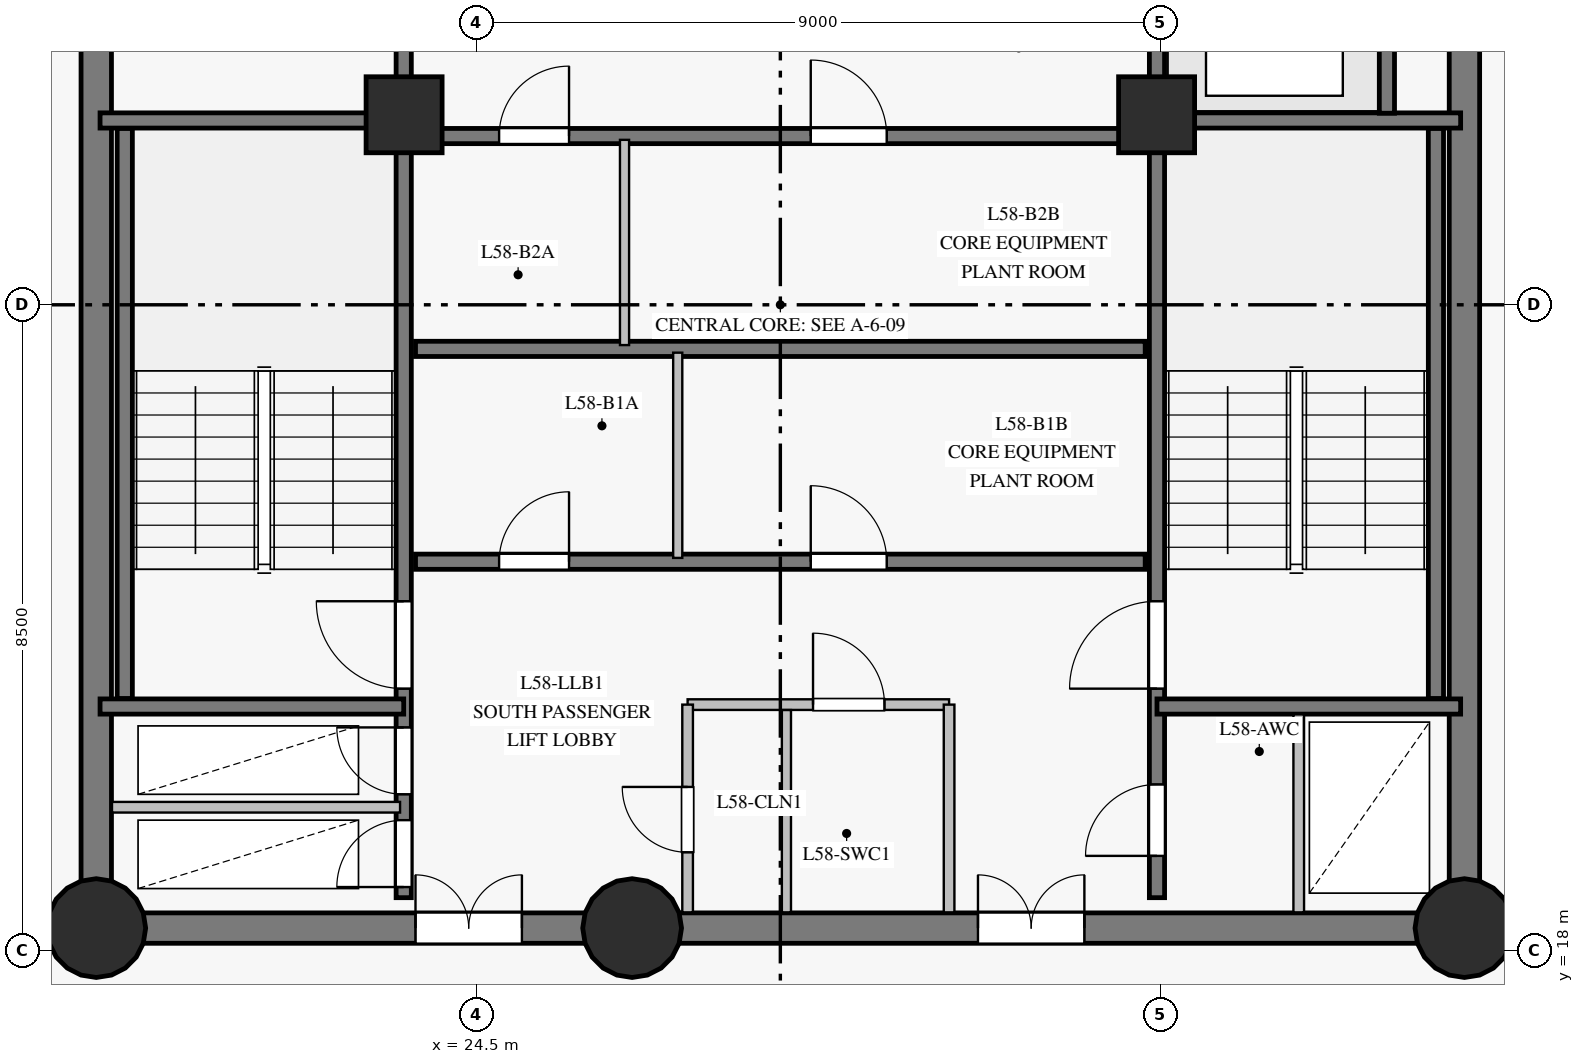
"""IFC4 building model, lengths in metres.
Left out: names, types, materials, properties, quantities, classifications, styles, units other than length and angle.
Written with IfcOpenShell. Run it as: python <this file> out.ifc"""

import sys

from ifc_helpers import new_model, si_unit, direction, frame, frame_2d, origin, origin_with_axes, origin_2d, place, context, subcontext, project, spatial, rectangle, circle, extrude, source, transform, mapped, element, fill, save


model = new_model("IFC4")
c1 = context("Model", 3, precision=1e-05, world=origin(), true_north=direction((0.0, 1.0)))
c2 = subcontext(c1, "Body", "Model", "MODEL_VIEW")
j1 = project(units=[si_unit("LENGTHUNIT", "METRE"), si_unit("PLANEANGLEUNIT", "RADIAN")], contexts=[c1])
p1 = place(None, origin())
s1 = spatial("IfcSite", under=j1, at=p1, CompositionType="ELEMENT")
p2 = place(p1, origin())
s2 = spatial("IfcBuilding", under=s1, at=p2, CompositionType="ELEMENT")
p3 = place(p2, frame((0.0, 0.0, 199.25)))
s3 = spatial("IfcBuildingStorey", under=s2, at=p3, CompositionType="ELEMENT", Elevation=199.25)
p4 = place(p3, frame((19.5, 18.3, 0.0), z_axis=(0.0, 0.0, 1.0), x_axis=(1.0, 0.0, 0.0)))
e1 = element("IfcWall", 1, at=p4, inside=s3, PredefinedType="SHEAR", context=c2, shape_type="SweptSolid", body=[
    extrude(rectangle(XDim=7.05, YDim=0.4, at=frame_2d((3.525, 0.0))), origin(), (0.0, 0.0, 1.0), 2.825),
])
p5 = place(p4, frame((4.2, 0.0, 0.0)))
e2 = element("IfcOpeningElement", 2, at=p5, cuts=e1, PredefinedType="OPENING", context=c2, shape_type="SweptSolid", body=[
    extrude(rectangle(XDim=1.4, YDim=2.2, at=frame_2d((0.7, 1.1))), frame((0.0, 0.21, 0.0), z_axis=(0.0, -1.0, 0.0), x_axis=(1.0, 0.0, 0.0)), (0.0, 0.0, 1.0), 0.42),
])
p6 = place(p3, frame((26.55, 18.3, 0.0), z_axis=(0.0, 0.0, 1.0), x_axis=(1.0, 0.0, 0.0)))
e3 = element("IfcWall", 3, at=p6, inside=s3, PredefinedType="SHEAR", context=c2, shape_type="SweptSolid", body=[
    extrude(rectangle(XDim=10.95, YDim=0.4, at=frame_2d((5.475, 0.0))), origin(), (0.0, 0.0, 1.0), 2.825),
])
p7 = place(p6, frame((4.55, 0.0, 0.0)))
e4 = element("IfcOpeningElement", 4, at=p7, cuts=e3, PredefinedType="OPENING", context=c2, shape_type="SweptSolid", body=[
    extrude(rectangle(XDim=1.4, YDim=2.2, at=frame_2d((0.7, 1.1))), frame((0.0, 0.21, 0.0), z_axis=(0.0, -1.0, 0.0), x_axis=(1.0, 0.0, 0.0)), (0.0, 0.0, 1.0), 0.42),
])
p8 = place(p3, frame((37.5, 18.3, 0.0), z_axis=(0.0, 0.0, 1.0), x_axis=(0.0, 1.0, 0.0)))
e5 = element("IfcWall", 5, at=p8, inside=s3, PredefinedType="SHEAR", context=c2, shape_type="SweptSolid", body=[
    extrude(rectangle(XDim=16.4, YDim=0.4, at=frame_2d((8.2, 0.0))), origin(), (0.0, 0.0, 1.0), 2.825),
])
p9 = place(p8, frame((13.85, 0.0, 0.0)))
e6 = element("IfcOpeningElement", 6, at=p9, cuts=e5, PredefinedType="OPENING", context=c2, shape_type="SweptSolid", body=[
    extrude(rectangle(XDim=1.2, YDim=2.15, at=frame_2d((0.6, 1.075))), frame((0.0, 0.21, 0.0), z_axis=(0.0, -1.0, 0.0), x_axis=(1.0, 0.0, 0.0)), (0.0, 0.0, 1.0), 0.42),
])
p10 = place(p3, frame((19.5, 34.7, 0.0), z_axis=(0.0, 0.0, 1.0), x_axis=(0.0, -1.0, 0.0)))
e7 = element("IfcWall", 7, at=p10, inside=s3, PredefinedType="SHEAR", context=c2, shape_type="SweptSolid", body=[
    extrude(rectangle(XDim=16.4, YDim=0.4, at=frame_2d((8.2, 0.0))), origin(), (0.0, 0.0, 1.0), 2.825),
])
p11 = place(p10, frame((3.24, 0.0, 0.0)))
e8 = element("IfcOpeningElement", 8, at=p11, cuts=e7, PredefinedType="OPENING", context=c2, shape_type="SweptSolid", body=[
    extrude(rectangle(XDim=1.1, YDim=2.15, at=frame_2d((0.55, 1.075))), frame((0.0, 0.21, 0.0), z_axis=(0.0, -1.0, 0.0), x_axis=(1.0, 0.0, 0.0)), (0.0, 0.0, 1.0), 0.42),
])
m1 = source(origin_with_axes(), c2, "Body", "SweptSolid", [
    extrude(circle(Radius=0.65, at=origin_2d()), origin(), (0.0, 0.0, 1.0), 3.05),
])
for number, where, z_axis, x_axis in (
    (9, (19.5, 18.3, 0.0), (0.0, 0.0, 1.0), (1.0, 0.0, 0.0)),
    (10, (26.55, 18.3, 0.0), (0.0, 0.0, 1.0), (1.0, 0.0, 0.0)),
    (11, (37.5, 18.3, 0.0), (0.0, 0.0, 1.0), (1.0, 0.0, 0.0)),
):
    element("IfcColumn", number, at=place(p3, frame(where, z_axis=z_axis, x_axis=x_axis)), inside=s3, PredefinedType="COLUMN", context=c2, shape_type="MappedRepresentation", body=[
        mapped(m1, transform((0.0, 0.0, 0.0), scale=1.0)),
    ])
m2 = source(origin_with_axes(), c2, "Body", "SweptSolid", [
    extrude(rectangle(XDim=1.0, YDim=1.0, at=origin_2d()), origin(), (0.0, 0.0, 1.0), 3.05),
])
for number, where, z_axis, x_axis in (
    (12, (23.55, 29.0, 0.0), (0.0, 0.0, 1.0), (1.0, 0.0, 0.0)),
    (13, (33.45, 29.0, 0.0), (0.0, 0.0, 1.0), (1.0, 0.0, 0.0)),
):
    element("IfcColumn", number, at=place(p3, frame(where, z_axis=z_axis, x_axis=x_axis)), inside=s3, PredefinedType="COLUMN", context=c2, shape_type="MappedRepresentation", body=[
        mapped(m2, transform((0.0, 0.0, 0.0), scale=1.0)),
    ])
p12 = place(p3, frame((23.545, 18.7, 0.0), z_axis=(0.0, 0.0, 1.0), x_axis=(0.0, 1.0, 0.0)))
e14 = element("IfcWall", 14, at=p12, inside=s3, PredefinedType="SHEAR", context=c2, shape_type="SweptSolid", body=[
    extrude(rectangle(XDim=15.6, YDim=0.2, at=frame_2d((7.8, 0.0))), origin(), (0.0, 0.0, 1.0), 2.825),
])
p13 = place(p12, frame((2.75, 0.0, 0.0)))
e15 = element("IfcOpeningElement", 15, at=p13, cuts=e14, PredefinedType="OPENING", context=c2, shape_type="SweptSolid", body=[
    extrude(rectangle(XDim=1.15, YDim=2.15, at=frame_2d((0.575, 1.075))), frame((0.0, 0.11, 0.0), z_axis=(0.0, -1.0, 0.0), x_axis=(1.0, 0.0, 0.0)), (0.0, 0.0, 1.0), 0.22),
])
p14 = place(p12, frame((0.14, 0.0, 0.0)))
e16 = element("IfcOpeningElement", 16, at=p14, cuts=e14, PredefinedType="OPENING", context=c2, shape_type="SweptSolid", body=[
    extrude(rectangle(XDim=0.88, YDim=2.1, at=frame_2d((0.44, 1.05))), frame((0.0, 0.11, 0.0), z_axis=(0.0, -1.0, 0.0), x_axis=(1.0, 0.0, 0.0)), (0.0, 0.0, 1.0), 0.22),
])
p15 = place(p12, frame((1.36, 0.0, 0.0)))
e17 = element("IfcOpeningElement", 17, at=p15, cuts=e14, PredefinedType="OPENING", context=c2, shape_type="SweptSolid", body=[
    extrude(rectangle(XDim=0.88, YDim=2.1, at=frame_2d((0.44, 1.05))), frame((0.0, 0.11, 0.0), z_axis=(0.0, -1.0, 0.0), x_axis=(1.0, 0.0, 0.0)), (0.0, 0.0, 1.0), 0.22),
])
p16 = place(p12, frame((12.1, 0.0, 0.0)))
e18 = element("IfcOpeningElement", 18, at=p16, cuts=e14, PredefinedType="OPENING", context=c2, shape_type="SweptSolid", body=[
    extrude(rectangle(XDim=1.12, YDim=2.15, at=frame_2d((0.56, 1.075))), frame((0.0, 0.11, 0.0), z_axis=(0.0, -1.0, 0.0), x_axis=(1.0, 0.0, 0.0)), (0.0, 0.0, 1.0), 0.22),
])
p17 = place(p12, frame((14.05, 0.0, 0.0)))
e19 = element("IfcOpeningElement", 19, at=p17, cuts=e14, PredefinedType="OPENING", context=c2, shape_type="SweptSolid", body=[
    extrude(rectangle(XDim=1.12, YDim=2.15, at=frame_2d((0.56, 1.075))), frame((0.0, 0.11, 0.0), z_axis=(0.0, -1.0, 0.0), x_axis=(1.0, 0.0, 0.0)), (0.0, 0.0, 1.0), 0.22),
])
p18 = place(p3, frame((33.455, 18.7, 0.0), z_axis=(0.0, 0.0, 1.0), x_axis=(0.0, 1.0, 0.0)))
e20 = element("IfcWall", 20, at=p18, inside=s3, PredefinedType="SHEAR", context=c2, shape_type="SweptSolid", body=[
    extrude(rectangle(XDim=15.6, YDim=0.2, at=frame_2d((7.8, 0.0))), origin(), (0.0, 0.0, 1.0), 2.825),
])
p19 = place(p18, frame((2.75, 0.0, 0.0)))
e21 = element("IfcOpeningElement", 21, at=p19, cuts=e20, PredefinedType="OPENING", context=c2, shape_type="SweptSolid", body=[
    extrude(rectangle(XDim=1.15, YDim=2.15, at=frame_2d((0.575, 1.075))), frame((0.0, 0.11, 0.0), z_axis=(0.0, -1.0, 0.0), x_axis=(1.0, 0.0, 0.0)), (0.0, 0.0, 1.0), 0.22),
])
p20 = place(p18, frame((0.55, 0.0, 0.0)))
e22 = element("IfcOpeningElement", 22, at=p20, cuts=e20, PredefinedType="OPENING", context=c2, shape_type="SweptSolid", body=[
    extrude(rectangle(XDim=0.94, YDim=2.1, at=frame_2d((0.47, 1.05))), frame((0.0, 0.11, 0.0), z_axis=(0.0, -1.0, 0.0), x_axis=(1.0, 0.0, 0.0)), (0.0, 0.0, 1.0), 0.22),
])
p21 = place(p3, frame((23.7, 23.12, 0.0), z_axis=(0.0, 0.0, 1.0), x_axis=(1.0, 0.0, 0.0)))
e23 = element("IfcWall", 23, at=p21, inside=s3, PredefinedType="SHEAR", context=c2, shape_type="SweptSolid", body=[
    extrude(rectangle(XDim=9.6, YDim=0.2, at=frame_2d((4.8, 0.0))), origin(), (0.0, 0.0, 1.0), 2.825),
])
p22 = place(p21, frame((1.1, 0.0, 0.0)))
e24 = element("IfcOpeningElement", 24, at=p22, cuts=e23, PredefinedType="OPENING", context=c2, shape_type="SweptSolid", body=[
    extrude(rectangle(XDim=0.92, YDim=2.1, at=frame_2d((0.46, 1.05))), frame((0.0, 0.11, 0.0), z_axis=(0.0, -1.0, 0.0), x_axis=(1.0, 0.0, 0.0)), (0.0, 0.0, 1.0), 0.22),
])
p23 = place(p21, frame((5.2, 0.0, 0.0)))
e25 = element("IfcOpeningElement", 25, at=p23, cuts=e23, PredefinedType="OPENING", context=c2, shape_type="SweptSolid", body=[
    extrude(rectangle(XDim=1.0, YDim=2.15, at=frame_2d((0.5, 1.075))), frame((0.0, 0.11, 0.0), z_axis=(0.0, -1.0, 0.0), x_axis=(1.0, 0.0, 0.0)), (0.0, 0.0, 1.0), 0.22),
])
p24 = place(p3, frame((23.7, 25.92, 0.0), z_axis=(0.0, 0.0, 1.0), x_axis=(1.0, 0.0, 0.0)))
e26 = element("IfcWall", 26, at=p24, inside=s3, PredefinedType="SHEAR", context=c2, shape_type="SweptSolid", body=[
    extrude(rectangle(XDim=9.6, YDim=0.2, at=frame_2d((4.8, 0.0))), origin(), (0.0, 0.0, 1.0), 2.825),
])
p25 = place(p3, frame((23.7, 28.72, 0.0), z_axis=(0.0, 0.0, 1.0), x_axis=(1.0, 0.0, 0.0)))
e27 = element("IfcWall", 27, at=p25, inside=s3, PredefinedType="SHEAR", context=c2, shape_type="SweptSolid", body=[
    extrude(rectangle(XDim=9.6, YDim=0.2, at=frame_2d((4.8, 0.0))), origin(), (0.0, 0.0, 1.0), 2.825),
])
p26 = place(p25, frame((1.1, 0.0, 0.0)))
e28 = element("IfcOpeningElement", 28, at=p26, cuts=e27, PredefinedType="OPENING", context=c2, shape_type="SweptSolid", body=[
    extrude(rectangle(XDim=0.92, YDim=2.1, at=frame_2d((0.46, 1.05))), frame((0.0, 0.11, 0.0), z_axis=(0.0, -1.0, 0.0), x_axis=(1.0, 0.0, 0.0)), (0.0, 0.0, 1.0), 0.22),
])
p27 = place(p25, frame((5.2, 0.0, 0.0)))
e29 = element("IfcOpeningElement", 29, at=p27, cuts=e27, PredefinedType="OPENING", context=c2, shape_type="SweptSolid", body=[
    extrude(rectangle(XDim=1.0, YDim=2.15, at=frame_2d((0.5, 1.075))), frame((0.0, 0.11, 0.0), z_axis=(0.0, -1.0, 0.0), x_axis=(1.0, 0.0, 0.0)), (0.0, 0.0, 1.0), 0.22),
])
for number, where, z_axis, x_axis in (
    (30, (19.875, 21.32, 0.0), (0.0, 0.0, 1.0), (0.0, 1.0, 0.0)),
    (31, (37.125, 21.32, 0.0), (0.0, 0.0, 1.0), (0.0, 1.0, 0.0)),
):
    element("IfcWall", number, at=place(p3, frame(where, z_axis=z_axis, x_axis=x_axis)), inside=s3, PredefinedType="SHEAR", context=c2, shape_type="SweptSolid", body=[
        extrude(rectangle(XDim=7.5, YDim=0.2, at=frame_2d((3.75, 0.0))), origin(), (0.0, 0.0, 1.0), 2.825),
    ])
for number, where, z_axis, x_axis in (
    (32, (33.455, 21.215, 0.0), (0.0, 0.0, 1.0), (1.0, 0.0, 0.0)),
    (33, (33.455, 28.925, 0.0), (0.0, 0.0, 1.0), (1.0, 0.0, 0.0)),
    (34, (19.55, 21.215, 0.0), (0.0, 0.0, 1.0), (1.0, 0.0, 0.0)),
    (35, (19.55, 28.925, 0.0), (0.0, 0.0, 1.0), (1.0, 0.0, 0.0)),
):
    element("IfcWall", number, at=place(p3, frame(where, z_axis=z_axis, x_axis=x_axis)), inside=s3, PredefinedType="SHEAR", context=c2, shape_type="SweptSolid", body=[
        extrude(rectangle(XDim=3.995, YDim=0.2, at=frame_2d((1.998, 0.0))), origin(), (0.0, 0.0, 1.0), 2.825),
    ])
p28 = place(p3, frame((36.48, 29.02, 0.0), z_axis=(0.0, 0.0, 1.0), x_axis=(0.0, 1.0, 0.0)))
e36 = element("IfcWall", 36, at=p28, inside=s3, PredefinedType="SHEAR", context=c2, shape_type="SweptSolid", body=[
    extrude(rectangle(XDim=2.86, YDim=0.2, at=frame_2d((1.43, 0.0))), origin(), (0.0, 0.0, 1.0), 2.825),
])
p29 = place(p3, frame((19.707, 19.89, 0.0), z_axis=(0.0, 0.0, 1.0), x_axis=(1.0, 0.0, 0.0)))
e37 = element("IfcWall", 37, at=p29, inside=s3, PredefinedType="PARTITIONING", context=c2, shape_type="SweptSolid", body=[
    extrude(rectangle(XDim=3.79, YDim=0.14, at=frame_2d((1.895, 0.0))), origin(), (0.0, 0.0, 1.0), 2.825),
])
p30 = place(p3, frame((27.28, 21.24, 0.0), z_axis=(0.0, 0.0, 1.0), x_axis=(1.0, 0.0, 0.0)))
e38 = element("IfcWall", 38, at=p30, inside=s3, PredefinedType="PARTITIONING", context=c2, shape_type="SweptSolid", body=[
    extrude(rectangle(XDim=3.44, YDim=0.14, at=frame_2d((1.72, 0.0))), origin(), (0.0, 0.0, 1.0), 2.825),
])
p31 = place(p30, frame((1.65, 0.0, 0.0)))
e39 = element("IfcOpeningElement", 39, at=p31, cuts=e38, PredefinedType="OPENING", context=c2, shape_type="SweptSolid", body=[
    extrude(rectangle(XDim=0.94, YDim=2.1, at=frame_2d((0.47, 1.05))), frame((0.0, 0.08, 0.0), z_axis=(0.0, -1.0, 0.0), x_axis=(1.0, 0.0, 0.0)), (0.0, 0.0, 1.0), 0.16),
])
p32 = place(p3, frame((27.15, 23.17, 0.0), z_axis=(0.0, 0.0, 1.0), x_axis=(0.0, 1.0, 0.0)))
e40 = element("IfcWall", 40, at=p32, inside=s3, PredefinedType="PARTITIONING", context=c2, shape_type="SweptSolid", body=[
    extrude(rectangle(XDim=2.7, YDim=0.12, at=frame_2d((1.35, 0.0))), origin(), (0.0, 0.0, 1.0), 2.825),
])
p33 = place(p3, frame((26.45, 25.97, 0.0), z_axis=(0.0, 0.0, 1.0), x_axis=(0.0, 1.0, 0.0)))
e41 = element("IfcWall", 41, at=p33, inside=s3, PredefinedType="PARTITIONING", context=c2, shape_type="SweptSolid", body=[
    extrude(rectangle(XDim=2.7, YDim=0.12, at=frame_2d((1.35, 0.0))), origin(), (0.0, 0.0, 1.0), 2.825),
])
p34 = place(p3, frame((27.28, 18.507, 0.0), z_axis=(0.0, 0.0, 1.0), x_axis=(0.0, 1.0, 0.0)))
e42 = element("IfcWall", 42, at=p34, inside=s3, PredefinedType="PARTITIONING", context=c2, shape_type="SweptSolid", body=[
    extrude(rectangle(XDim=2.733, YDim=0.14, at=frame_2d((1.366, 0.0))), origin(), (0.0, 0.0, 1.0), 2.825),
])
p35 = place(p34, frame((0.79, 0.0, 0.0)))
e43 = element("IfcOpeningElement", 43, at=p35, cuts=e42, PredefinedType="OPENING", context=c2, shape_type="SweptSolid", body=[
    extrude(rectangle(XDim=0.86, YDim=2.1, at=frame_2d((0.43, 1.05))), frame((0.0, 0.08, 0.0), z_axis=(0.0, -1.0, 0.0), x_axis=(1.0, 0.0, 0.0)), (0.0, 0.0, 1.0), 0.16),
])
p36 = place(p3, frame((30.72, 18.507, 0.0), z_axis=(0.0, 0.0, 1.0), x_axis=(0.0, 1.0, 0.0)))
e44 = element("IfcWall", 44, at=p36, inside=s3, PredefinedType="PARTITIONING", context=c2, shape_type="SweptSolid", body=[
    extrude(rectangle(XDim=2.733, YDim=0.14, at=frame_2d((1.366, 0.0))), origin(), (0.0, 0.0, 1.0), 2.825),
])
p37 = place(p3, frame((28.58, 18.507, 0.0), z_axis=(0.0, 0.0, 1.0), x_axis=(0.0, 1.0, 0.0)))
e45 = element("IfcWall", 45, at=p37, inside=s3, PredefinedType="PARTITIONING", context=c2, shape_type="SweptSolid", body=[
    extrude(rectangle(XDim=2.662, YDim=0.12, at=frame_2d((1.331, 0.0))), origin(), (0.0, 0.0, 1.0), 2.825),
])
p38 = place(p3, frame((35.32, 18.507, 0.0), z_axis=(0.0, 0.0, 1.0), x_axis=(0.0, 1.0, 0.0)))
e46 = element("IfcWall", 46, at=p38, inside=s3, PredefinedType="PARTITIONING", context=c2, shape_type="SweptSolid", body=[
    extrude(rectangle(XDim=2.604, YDim=0.14, at=frame_2d((1.302, 0.0))), origin(), (0.0, 0.0, 1.0), 2.825),
])
m3 = source(origin_with_axes(), c2, "Body", "SweptSolid", [
    extrude(rectangle(XDim=1.15, YDim=2.15, at=frame_2d((0.575, 1.075))), frame((0.0, 0.025, 0.0), z_axis=(0.0, -1.0, 0.0), x_axis=(1.0, 0.0, 0.0)), (0.0, 0.0, 1.0), 0.05),
])
p39 = place(p13, origin())
e47 = element("IfcDoor", 47, at=p39, inside=s3, OperationType="SINGLE_SWING_RIGHT", PredefinedType="DOOR", context=c2, shape_type="MappedRepresentation", body=[
    mapped(m3, transform((0.0, 0.0, 0.0), scale=1.0)),
])
fill(e15, e47)
p40 = place(p19, origin())
e48 = element("IfcDoor", 48, at=p40, inside=s3, OperationType="SINGLE_SWING_LEFT", PredefinedType="DOOR", context=c2, shape_type="MappedRepresentation", body=[
    mapped(m3, transform((0.0, 0.0, 0.0), scale=1.0)),
])
fill(e21, e48)
m4 = source(origin_with_axes(), c2, "Body", "SweptSolid", [
    extrude(rectangle(XDim=0.88, YDim=2.1, at=frame_2d((0.44, 1.05))), frame((0.0, 0.025, 0.0), z_axis=(0.0, -1.0, 0.0), x_axis=(1.0, 0.0, 0.0)), (0.0, 0.0, 1.0), 0.05),
])
p41 = place(p14, origin())
e49 = element("IfcDoor", 49, at=p41, inside=s3, OperationType="SINGLE_SWING_LEFT", PredefinedType="DOOR", context=c2, shape_type="MappedRepresentation", body=[
    mapped(m4, transform((0.0, 0.0, 0.0), scale=1.0)),
])
fill(e16, e49)
p42 = place(p15, origin())
e50 = element("IfcDoor", 50, at=p42, inside=s3, OperationType="SINGLE_SWING_RIGHT", PredefinedType="DOOR", context=c2, shape_type="MappedRepresentation", body=[
    mapped(m4, transform((0.0, 0.0, 0.0), scale=1.0)),
])
fill(e17, e50)
m5 = source(origin_with_axes(), c2, "Body", "SweptSolid", [
    extrude(rectangle(XDim=1.4, YDim=2.2, at=frame_2d((0.7, 1.1))), frame((0.0, 0.025, 0.0), z_axis=(0.0, -1.0, 0.0), x_axis=(1.0, 0.0, 0.0)), (0.0, 0.0, 1.0), 0.05),
])
p43 = place(p5, origin())
e51 = element("IfcDoor", 51, at=p43, inside=s3, OperationType="DOUBLE_DOOR_SINGLE_SWING", PredefinedType="DOOR", context=c2, shape_type="MappedRepresentation", body=[
    mapped(m5, transform((0.0, 0.0, 0.0), scale=1.0)),
])
fill(e2, e51)
p44 = place(p7, origin())
e52 = element("IfcDoor", 52, at=p44, inside=s3, OperationType="DOUBLE_DOOR_SINGLE_SWING", PredefinedType="DOOR", context=c2, shape_type="MappedRepresentation", body=[
    mapped(m5, transform((0.0, 0.0, 0.0), scale=1.0)),
])
fill(e4, e52)
m6 = source(origin_with_axes(), c2, "Body", "SweptSolid", [
    extrude(rectangle(XDim=0.94, YDim=2.1, at=frame_2d((0.47, 1.05))), frame((0.0, 0.025, 0.0), z_axis=(0.0, -1.0, 0.0), x_axis=(1.0, 0.0, 0.0)), (0.0, 0.0, 1.0), 0.05),
])
p45 = place(p20, origin())
e53 = element("IfcDoor", 53, at=p45, inside=s3, OperationType="SINGLE_SWING_LEFT", PredefinedType="DOOR", context=c2, shape_type="MappedRepresentation", body=[
    mapped(m6, transform((0.0, 0.0, 0.0), scale=1.0)),
])
fill(e22, e53)
m7 = source(origin_with_axes(), c2, "Body", "SweptSolid", [
    extrude(rectangle(XDim=0.86, YDim=2.1, at=frame_2d((0.43, 1.05))), frame((0.0, 0.025, 0.0), z_axis=(0.0, -1.0, 0.0), x_axis=(1.0, 0.0, 0.0)), (0.0, 0.0, 1.0), 0.05),
])
p46 = place(p35, origin())
e54 = element("IfcDoor", 54, at=p46, inside=s3, OperationType="SINGLE_SWING_RIGHT", PredefinedType="DOOR", context=c2, shape_type="MappedRepresentation", body=[
    mapped(m7, transform((0.0, 0.0, 0.0), scale=1.0)),
])
fill(e43, e54)
p47 = place(p31, origin())
e55 = element("IfcDoor", 55, at=p47, inside=s3, OperationType="SINGLE_SWING_LEFT", PredefinedType="DOOR", context=c2, shape_type="MappedRepresentation", body=[
    mapped(m6, transform((0.0, 0.0, 0.0), scale=1.0)),
])
fill(e39, e55)
m8 = source(origin_with_axes(), c2, "Body", "SweptSolid", [
    extrude(rectangle(XDim=0.92, YDim=2.1, at=frame_2d((0.46, 1.05))), frame((0.0, 0.025, 0.0), z_axis=(0.0, -1.0, 0.0), x_axis=(1.0, 0.0, 0.0)), (0.0, 0.0, 1.0), 0.05),
])
p48 = place(p22, origin())
e56 = element("IfcDoor", 56, at=p48, inside=s3, OperationType="SINGLE_SWING_RIGHT", PredefinedType="DOOR", context=c2, shape_type="MappedRepresentation", body=[
    mapped(m8, transform((0.0, 0.0, 0.0), scale=1.0)),
])
fill(e24, e56)
m9 = source(origin_with_axes(), c2, "Body", "SweptSolid", [
    extrude(rectangle(XDim=1.0, YDim=2.15, at=frame_2d((0.5, 1.075))), frame((0.0, 0.025, 0.0), z_axis=(0.0, -1.0, 0.0), x_axis=(1.0, 0.0, 0.0)), (0.0, 0.0, 1.0), 0.05),
])
p49 = place(p23, origin())
e57 = element("IfcDoor", 57, at=p49, inside=s3, OperationType="SINGLE_SWING_LEFT", PredefinedType="DOOR", context=c2, shape_type="MappedRepresentation", body=[
    mapped(m9, transform((0.0, 0.0, 0.0), scale=1.0)),
])
fill(e25, e57)
p50 = place(p26, origin())
e58 = element("IfcDoor", 58, at=p50, inside=s3, OperationType="SINGLE_SWING_RIGHT", PredefinedType="DOOR", context=c2, shape_type="MappedRepresentation", body=[
    mapped(m8, transform((0.0, 0.0, 0.0), scale=1.0)),
])
fill(e28, e58)
p51 = place(p27, origin())
e59 = element("IfcDoor", 59, at=p51, inside=s3, OperationType="SINGLE_SWING_LEFT", PredefinedType="DOOR", context=c2, shape_type="MappedRepresentation", body=[
    mapped(m9, transform((0.0, 0.0, 0.0), scale=1.0)),
])
fill(e29, e59)
save(model, sys.argv[1])
